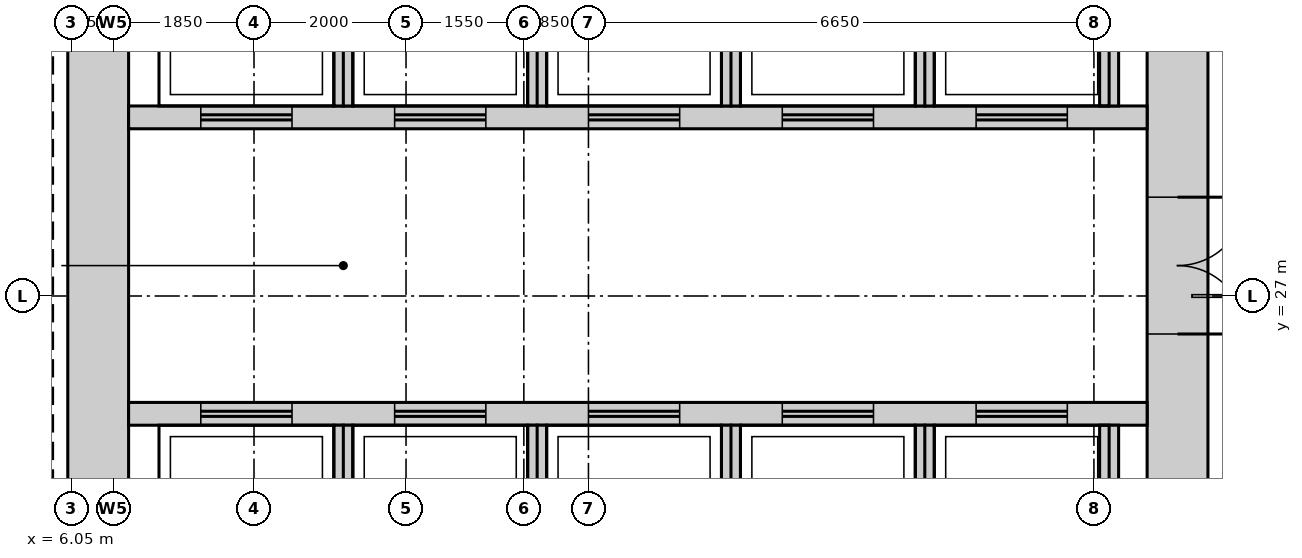
"""IFC4 building model, lengths in metres.
Left out: names, types, materials, properties, quantities, classifications, styles, units other than length and angle.
Written with IfcOpenShell. Run it as: python <this file> out.ifc"""

import sys

from ifc_helpers import new_model, si_unit, direction, frame, frame_2d, origin, place, context, subcontext, project, spatial, rectangle, extrude, source, transform, mapped, element, fill, save


model = new_model("IFC4")
c1 = context("Model", 3, precision=1e-05, world=origin(), true_north=direction((0.0, 1.0)))
c2 = subcontext(c1, "Body", "Model", "MODEL_VIEW")
j1 = project(units=[si_unit("LENGTHUNIT", "METRE"), si_unit("PLANEANGLEUNIT", "RADIAN")], contexts=[c1])
p1 = place(None, origin())
s1 = spatial("IfcSite", under=j1, at=p1, CompositionType="ELEMENT")
p2 = place(p1, origin())
s2 = spatial("IfcBuilding", under=s1, at=p2, CompositionType="ELEMENT")
p3 = place(p2, frame((0.0, 0.0, 216.7)))
s3 = spatial("IfcBuildingStorey", under=s2, at=p3, CompositionType="ELEMENT", Elevation=216.7)
m1 = source(origin(), c2, "Body", "SweptSolid", [
    extrude(rectangle(XDim=22.4, YDim=0.8, at=frame_2d((11.2, 0.0))), origin(), (0.0, 0.0, 1.0), 5.25),
])
p4 = place(p3, frame((20.6, 15.8, 0.0), z_axis=(0.0, 0.0, 1.0), x_axis=(0.0, 1.0, 0.0)))
e1 = element("IfcWall", 1, at=p4, inside=s3, PredefinedType="SHEAR", context=c2, shape_type="MappedRepresentation", body=[
    mapped(m1, transform((0.0, 0.0, 0.0))),
])
m2 = source(origin(), c2, "Body", "SweptSolid", [
    extrude(rectangle(XDim=1.8, YDim=2.1, at=frame_2d((0.9, 1.05))), frame((0.0, 0.41, 0.0), z_axis=(0.0, -1.0, 0.0), x_axis=(1.0, 0.0, 0.0)), (0.0, 0.0, 1.0), 0.82),
])
p5 = place(p4, frame((10.7, 0.0, 0.0)))
e2 = element("IfcOpeningElement", 2, at=p5, cuts=e1, PredefinedType="OPENING", context=c2, shape_type="MappedRepresentation", body=[
    mapped(m2, transform((0.0, 0.0, 0.0))),
])
m3 = source(origin(), c2, "Body", "SweptSolid", [
    extrude(rectangle(XDim=0.9, YDim=2.1, at=frame_2d((0.45, 1.05))), frame((0.0, 0.41, 0.0), z_axis=(0.0, -1.0, 0.0), x_axis=(1.0, 0.0, 0.0)), (0.0, 0.0, 1.0), 0.82),
])
p6 = place(p4, frame((1.35, 0.0, 0.0)))
e3 = element("IfcOpeningElement", 3, at=p6, cuts=e1, PredefinedType="OPENING", context=c2, shape_type="MappedRepresentation", body=[
    mapped(m3, transform((0.0, 0.0, 0.0))),
])
p7 = place(p4, frame((4.9, 0.0, 0.0)))
e4 = element("IfcOpeningElement", 4, at=p7, cuts=e1, PredefinedType="OPENING", context=c2, shape_type="MappedRepresentation", body=[
    mapped(m3, transform((0.0, 0.0, 0.0))),
])
p8 = place(p3, frame((6.4, 15.8, 0.0), z_axis=(0.0, 0.0, 1.0), x_axis=(0.0, 1.0, 0.0)))
e5 = element("IfcWall", 5, at=p8, inside=s3, PredefinedType="SHEAR", context=c2, shape_type="MappedRepresentation", body=[
    mapped(m1, transform((0.0, 0.0, 0.0))),
])
m4 = source(origin(), c2, "Body", "SweptSolid", [
    extrude(rectangle(XDim=13.4, YDim=0.3, at=frame_2d((6.7, 0.0))), origin(), (0.0, 0.0, 1.0), 5.25),
])
p9 = place(p3, frame((6.8, 29.35, 0.0), z_axis=(0.0, 0.0, 1.0), x_axis=(1.0, 0.0, 0.0)))
e6 = element("IfcWall", 6, at=p9, inside=s3, PredefinedType="STANDARD", context=c2, shape_type="MappedRepresentation", body=[
    mapped(m4, transform((0.0, 0.0, 0.0))),
])
m5 = source(origin(), c2, "Body", "SweptSolid", [
    extrude(rectangle(XDim=1.2, YDim=2.1, at=frame_2d((0.6, 1.05))), frame((0.0, 0.16, 0.0), z_axis=(0.0, -1.0, 0.0), x_axis=(1.0, 0.0, 0.0)), (0.0, 0.0, 1.0), 0.32),
])
p10 = place(p9, frame((0.95, 0.0, 0.0)))
e7 = element("IfcOpeningElement", 7, at=p10, cuts=e6, PredefinedType="OPENING", context=c2, shape_type="MappedRepresentation", body=[
    mapped(m5, transform((0.0, 0.0, 0.0))),
])
p11 = place(p9, frame((3.5, 0.0, 0.0)))
e8 = element("IfcOpeningElement", 8, at=p11, cuts=e6, PredefinedType="OPENING", context=c2, shape_type="MappedRepresentation", body=[
    mapped(m5, transform((0.0, 0.0, 0.0))),
])
p12 = place(p9, frame((6.05, 0.0, 0.0)))
e9 = element("IfcOpeningElement", 9, at=p12, cuts=e6, PredefinedType="OPENING", context=c2, shape_type="MappedRepresentation", body=[
    mapped(m5, transform((0.0, 0.0, 0.0))),
])
p13 = place(p9, frame((8.6, 0.0, 0.0)))
e10 = element("IfcOpeningElement", 10, at=p13, cuts=e6, PredefinedType="OPENING", context=c2, shape_type="MappedRepresentation", body=[
    mapped(m5, transform((0.0, 0.0, 0.0))),
])
p14 = place(p9, frame((11.15, 0.0, 0.0)))
e11 = element("IfcOpeningElement", 11, at=p14, cuts=e6, PredefinedType="OPENING", context=c2, shape_type="MappedRepresentation", body=[
    mapped(m5, transform((0.0, 0.0, 0.0))),
])
p15 = place(p3, frame((6.8, 25.45, 0.0), z_axis=(0.0, 0.0, 1.0), x_axis=(1.0, 0.0, 0.0)))
e12 = element("IfcWall", 12, at=p15, inside=s3, PredefinedType="STANDARD", context=c2, shape_type="MappedRepresentation", body=[
    mapped(m4, transform((0.0, 0.0, 0.0))),
])
p16 = place(p15, frame((0.95, 0.0, 0.0)))
e13 = element("IfcOpeningElement", 13, at=p16, cuts=e12, PredefinedType="OPENING", context=c2, shape_type="MappedRepresentation", body=[
    mapped(m5, transform((0.0, 0.0, 0.0))),
])
p17 = place(p15, frame((3.5, 0.0, 0.0)))
e14 = element("IfcOpeningElement", 14, at=p17, cuts=e12, PredefinedType="OPENING", context=c2, shape_type="MappedRepresentation", body=[
    mapped(m5, transform((0.0, 0.0, 0.0))),
])
p18 = place(p15, frame((6.05, 0.0, 0.0)))
e15 = element("IfcOpeningElement", 15, at=p18, cuts=e12, PredefinedType="OPENING", context=c2, shape_type="MappedRepresentation", body=[
    mapped(m5, transform((0.0, 0.0, 0.0))),
])
p19 = place(p15, frame((8.6, 0.0, 0.0)))
e16 = element("IfcOpeningElement", 16, at=p19, cuts=e12, PredefinedType="OPENING", context=c2, shape_type="MappedRepresentation", body=[
    mapped(m5, transform((0.0, 0.0, 0.0))),
])
p20 = place(p15, frame((11.15, 0.0, 0.0)))
e17 = element("IfcOpeningElement", 17, at=p20, cuts=e12, PredefinedType="OPENING", context=c2, shape_type="MappedRepresentation", body=[
    mapped(m5, transform((0.0, 0.0, 0.0))),
])
m6 = source(origin(), c2, "Body", "SweptSolid", [
    extrude(rectangle(XDim=2.4, YDim=0.25, at=frame_2d((1.2, 0.0))), origin(), (0.0, 0.0, 1.0), 5.25),
])
for number, where, z_axis, x_axis in (
    (18, (17.275, 29.5, 0.0), (0.0, 0.0, 1.0), (0.0, 1.0, 0.0)),
    (19, (19.7, 29.5, 0.0), (0.0, 0.0, 1.0), (0.0, 1.0, 0.0)),
    (20, (9.625, 29.5, 0.0), (0.0, 0.0, 1.0), (0.0, 1.0, 0.0)),
    (21, (12.175, 29.5, 0.0), (0.0, 0.0, 1.0), (0.0, 1.0, 0.0)),
    (22, (14.725, 29.5, 0.0), (0.0, 0.0, 1.0), (0.0, 1.0, 0.0)),
):
    element("IfcWall", number, at=place(p3, frame(where, z_axis=z_axis, x_axis=x_axis)), inside=s3, PredefinedType="STANDARD", context=c2, shape_type="MappedRepresentation", body=[
        mapped(m6, transform((0.0, 0.0, 0.0))),
    ])
m7 = source(origin(), c2, "Body", "SweptSolid", [
    extrude(rectangle(XDim=2.4, YDim=0.25, at=frame_2d((1.2, 0.0))), origin(), (0.0, 0.0, 1.0), 5.25),
])
for number, where, z_axis, x_axis in (
    (23, (17.275, 22.9, 0.0), (0.0, 0.0, 1.0), (0.0, 1.0, 0.0)),
    (24, (19.7, 22.9, 0.0), (0.0, 0.0, 1.0), (0.0, 1.0, 0.0)),
    (25, (9.625, 22.9, 0.0), (0.0, 0.0, 1.0), (0.0, 1.0, 0.0)),
    (26, (12.175, 22.9, 0.0), (0.0, 0.0, 1.0), (0.0, 1.0, 0.0)),
    (27, (14.725, 22.9, 0.0), (0.0, 0.0, 1.0), (0.0, 1.0, 0.0)),
):
    element("IfcWall", number, at=place(p3, frame(where, z_axis=z_axis, x_axis=x_axis)), inside=s3, PredefinedType="STANDARD", context=c2, shape_type="MappedRepresentation", body=[
        mapped(m7, transform((0.0, 0.0, 0.0))),
    ])
m8 = source(origin(), c2, "Body", "SweptSolid", [
    extrude(rectangle(XDim=1.8, YDim=2.1, at=frame_2d((0.9, 1.05))), frame((0.0, 0.35, 0.0), z_axis=(0.0, -1.0, 0.0), x_axis=(1.0, 0.0, 0.0)), (0.0, 0.0, 1.0), 0.7),
])
p21 = place(p5, origin())
e28 = element("IfcDoor", 28, at=p21, inside=s3, OperationType="DOUBLE_DOOR_SINGLE_SWING", PredefinedType="DOOR", context=c2, shape_type="MappedRepresentation", body=[
    mapped(m8, transform((0.0, 0.0, 0.0))),
])
fill(e2, e28)
m9 = source(origin(), c2, "Body", "SweptSolid", [
    extrude(rectangle(XDim=1.2, YDim=2.1, at=frame_2d((0.6, 1.05))), frame((0.0, 0.025, 0.0), z_axis=(0.0, -1.0, 0.0), x_axis=(1.0, 0.0, 0.0)), (0.0, 0.0, 1.0), 0.05),
])
p22 = place(p16, origin())
e29 = element("IfcDoor", 29, at=p22, inside=s3, OperationType="DOUBLE_DOOR_SLIDING", PredefinedType="DOOR", context=c2, shape_type="MappedRepresentation", body=[
    mapped(m9, transform((0.0, 0.0, 0.0))),
])
fill(e13, e29)
p23 = place(p17, origin())
e30 = element("IfcDoor", 30, at=p23, inside=s3, OperationType="DOUBLE_DOOR_SLIDING", PredefinedType="DOOR", context=c2, shape_type="MappedRepresentation", body=[
    mapped(m9, transform((0.0, 0.0, 0.0))),
])
fill(e14, e30)
p24 = place(p18, origin())
e31 = element("IfcDoor", 31, at=p24, inside=s3, OperationType="DOUBLE_DOOR_SLIDING", PredefinedType="DOOR", context=c2, shape_type="MappedRepresentation", body=[
    mapped(m9, transform((0.0, 0.0, 0.0))),
])
fill(e15, e31)
p25 = place(p19, origin())
e32 = element("IfcDoor", 32, at=p25, inside=s3, OperationType="DOUBLE_DOOR_SLIDING", PredefinedType="DOOR", context=c2, shape_type="MappedRepresentation", body=[
    mapped(m9, transform((0.0, 0.0, 0.0))),
])
fill(e16, e32)
p26 = place(p20, origin())
e33 = element("IfcDoor", 33, at=p26, inside=s3, OperationType="DOUBLE_DOOR_SLIDING", PredefinedType="DOOR", context=c2, shape_type="MappedRepresentation", body=[
    mapped(m9, transform((0.0, 0.0, 0.0))),
])
fill(e17, e33)
p27 = place(p10, origin())
e34 = element("IfcDoor", 34, at=p27, inside=s3, OperationType="DOUBLE_DOOR_SLIDING", PredefinedType="DOOR", context=c2, shape_type="MappedRepresentation", body=[
    mapped(m9, transform((0.0, 0.0, 0.0))),
])
fill(e7, e34)
p28 = place(p11, origin())
e35 = element("IfcDoor", 35, at=p28, inside=s3, OperationType="DOUBLE_DOOR_SLIDING", PredefinedType="DOOR", context=c2, shape_type="MappedRepresentation", body=[
    mapped(m9, transform((0.0, 0.0, 0.0))),
])
fill(e8, e35)
p29 = place(p12, origin())
e36 = element("IfcDoor", 36, at=p29, inside=s3, OperationType="DOUBLE_DOOR_SLIDING", PredefinedType="DOOR", context=c2, shape_type="MappedRepresentation", body=[
    mapped(m9, transform((0.0, 0.0, 0.0))),
])
fill(e9, e36)
p30 = place(p13, origin())
e37 = element("IfcDoor", 37, at=p30, inside=s3, OperationType="DOUBLE_DOOR_SLIDING", PredefinedType="DOOR", context=c2, shape_type="MappedRepresentation", body=[
    mapped(m9, transform((0.0, 0.0, 0.0))),
])
fill(e10, e37)
p31 = place(p14, origin())
e38 = element("IfcDoor", 38, at=p31, inside=s3, OperationType="DOUBLE_DOOR_SLIDING", PredefinedType="DOOR", context=c2, shape_type="MappedRepresentation", body=[
    mapped(m9, transform((0.0, 0.0, 0.0))),
])
fill(e11, e38)
save(model, sys.argv[1])
